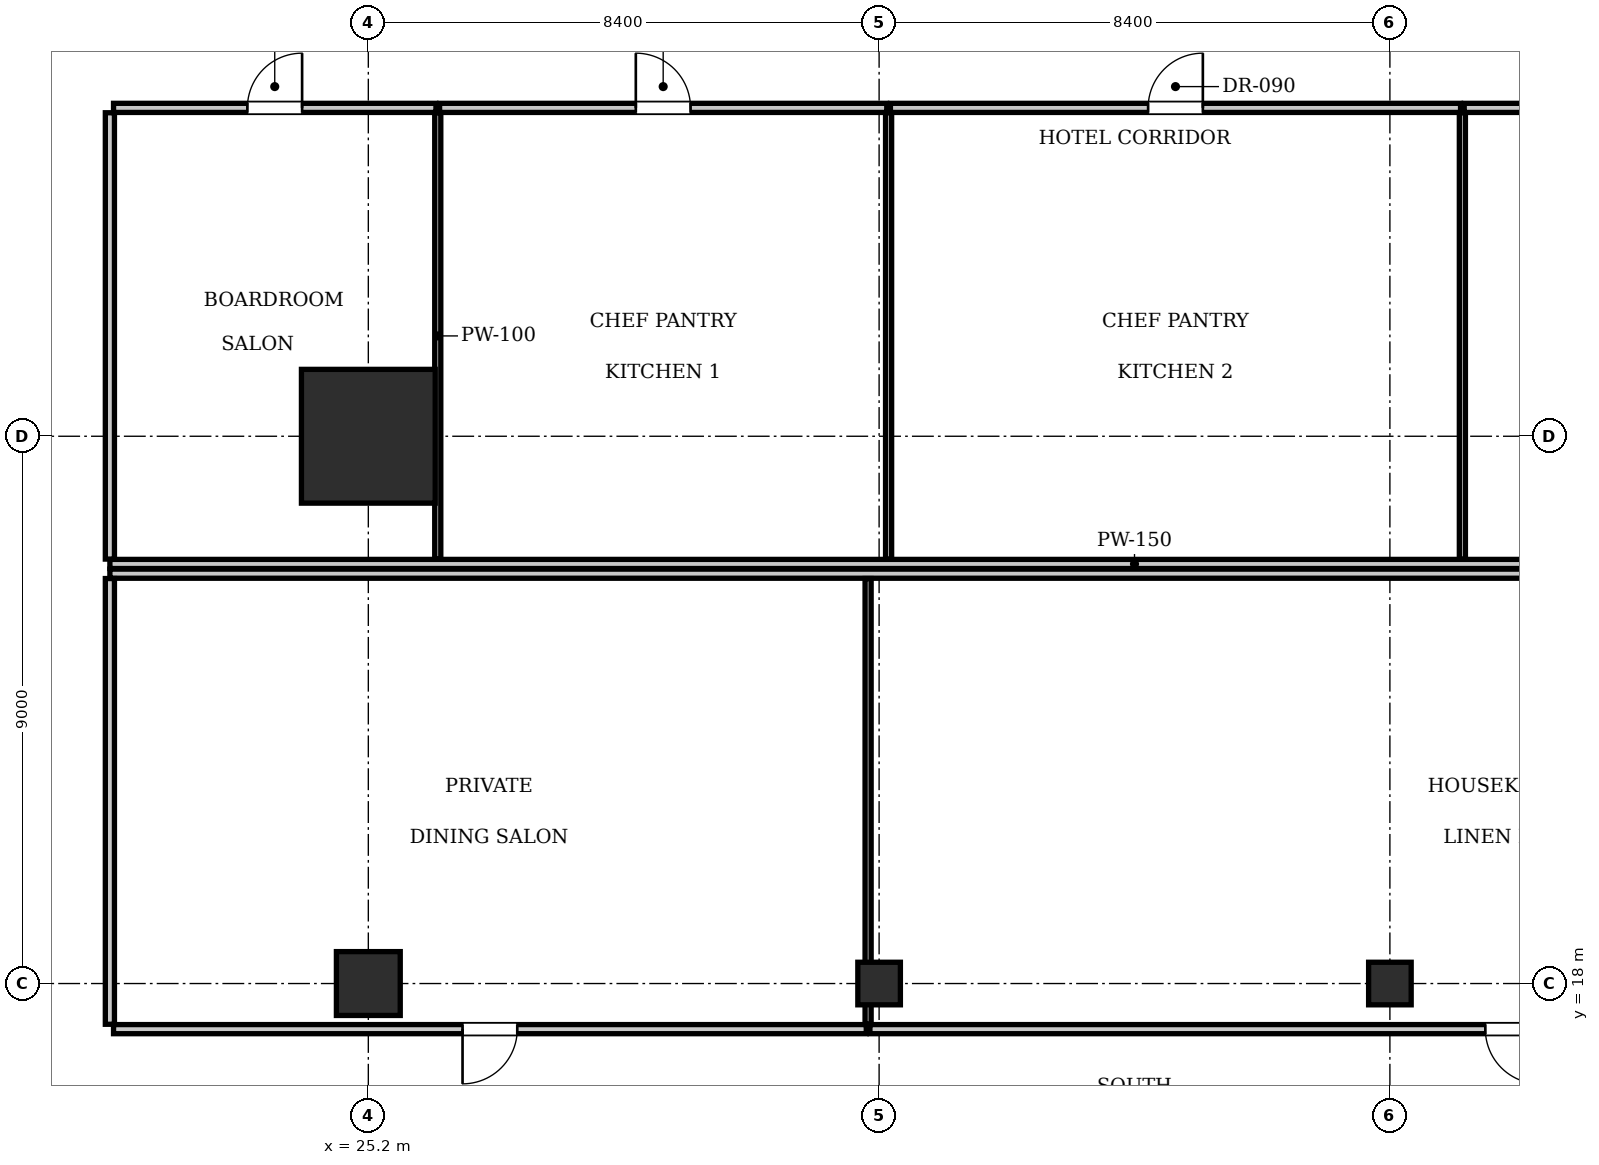
"""IFC4 building model, lengths in metres.
Left out: names, types, materials, properties, quantities, classifications, styles, units other than length and angle.
Written with IfcOpenShell. Run it as: python <this file> out.ifc"""

import sys

from ifc_helpers import new_model, si_unit, direction, frame, frame_2d, origin, origin_2d, place, context, subcontext, project, spatial, rectangle, i_section, extrude, element, fill, save


model = new_model("IFC4")
c1 = context("Model", 3, precision=1e-05, world=origin(), true_north=direction((0.0, 1.0)))
c2 = subcontext(c1, "Body", "Model", "MODEL_VIEW")
j1 = project(units=[si_unit("LENGTHUNIT", "METRE"), si_unit("PLANEANGLEUNIT", "RADIAN")], contexts=[c1])
p1 = place(None, origin())
s1 = spatial("IfcSite", under=j1, at=p1, CompositionType="ELEMENT")
p2 = place(p1, origin())
s2 = spatial("IfcBuilding", under=s1, at=p2, CompositionType="ELEMENT")
p3 = place(p2, frame((0.0, 0.0, 103.95)))
s3 = spatial("IfcBuildingStorey", under=s2, at=p3, CompositionType="ELEMENT", Elevation=103.95)
p4 = place(p3, frame((25.2, 27.0, 0.0), z_axis=(0.0, 0.0, 1.0), x_axis=(1.0, 0.0, 0.0)))
e1 = element("IfcColumn", 1, at=p4, inside=s3, PredefinedType="COLUMN", context=c2, shape_type="SweptSolid", body=[
    extrude(rectangle(XDim=2.2, YDim=2.2, at=origin_2d()), origin(), (0.0, 0.0, 1.0), 3.85),
])
p5 = place(p3, frame((25.2, 18.0, 0.0), z_axis=(0.0, 0.0, 1.0), x_axis=(1.0, 0.0, 0.0)))
e2 = element("IfcColumn", 2, at=p5, inside=s3, PredefinedType="COLUMN", context=c2, shape_type="SweptSolid", body=[
    extrude(rectangle(XDim=1.05, YDim=1.05, at=origin_2d()), origin(), (0.0, 0.0, 1.0), 3.85),
])
for number, where, z_axis, x_axis in (
    (3, (33.6, 18.0, 0.0), (0.0, 0.0, 1.0), (1.0, 0.0, 0.0)),
    (4, (42.0, 18.0, 0.0), (0.0, 0.0, 1.0), (1.0, 0.0, 0.0)),
):
    element("IfcColumn", number, at=place(p3, frame(where, z_axis=z_axis, x_axis=x_axis)), inside=s3, PredefinedType="COLUMN", context=c2, shape_type="SweptSolid", body=[
        extrude(i_section(OverallWidth=0.7, OverallDepth=0.7, WebThickness=0.028, FlangeThickness=0.044, at=origin_2d()), origin(), (0.0, 0.0, 1.0), 3.85),
    ])
p6 = place(p3, frame((20.95, 24.9, 0.0), z_axis=(0.0, 0.0, 1.0), x_axis=(1.0, 0.0, 0.0)))
e5 = element("IfcWall", 5, at=p6, inside=s3, PredefinedType="PARTITIONING", context=c2, shape_type="SweptSolid", body=[
    extrude(rectangle(XDim=33.7, YDim=0.15, at=frame_2d((16.85, 0.0))), origin(), (0.0, 0.0, 1.0), 3.61),
])
p7 = place(p3, frame((20.95, 24.98, 0.0), z_axis=(0.0, 0.0, 1.0), x_axis=(0.0, 1.0, 0.0)))
e6 = element("IfcWall", 6, at=p7, inside=s3, PredefinedType="PARTITIONING", context=c2, shape_type="SweptSolid", body=[
    extrude(rectangle(XDim=7.34, YDim=0.15, at=frame_2d((3.67, 0.0))), origin(), (0.0, 0.0, 1.0), 3.293),
])
p8 = place(p3, frame((21.01, 32.4, 0.0), z_axis=(0.0, 0.0, 1.0), x_axis=(1.0, 0.0, 0.0)))
e7 = element("IfcWall", 7, at=p8, inside=s3, PredefinedType="PARTITIONING", context=c2, shape_type="SweptSolid", body=[
    extrude(rectangle(XDim=5.302, YDim=0.15, at=frame_2d((2.651, 0.0))), origin(), (0.0, 0.0, 1.0), 3.61),
])
p9 = place(p8, frame((2.201, 0.0, 0.0)))
e8 = element("IfcOpeningElement", 8, at=p9, cuts=e7, PredefinedType="OPENING", context=c2, shape_type="SweptSolid", body=[
    extrude(rectangle(XDim=0.9, YDim=2.1, at=frame_2d((0.45, 1.05))), frame((0.0, 0.085, 0.0), z_axis=(0.0, -1.0, 0.0), x_axis=(1.0, 0.0, 0.0)), (0.0, 0.0, 1.0), 0.17),
])
p10 = place(p3, frame((26.342, 24.98, 0.0), z_axis=(0.0, 0.0, 1.0), x_axis=(0.0, 1.0, 0.0)))
e9 = element("IfcWall", 9, at=p10, inside=s3, PredefinedType="PARTITIONING", context=c2, shape_type="SweptSolid", body=[
    extrude(rectangle(XDim=7.34, YDim=0.1, at=frame_2d((3.67, 0.0))), origin(), (0.0, 0.0, 1.0), 3.61),
])
p11 = place(p3, frame((26.372, 32.4, 0.0), z_axis=(0.0, 0.0, 1.0), x_axis=(1.0, 0.0, 0.0)))
e10 = element("IfcWall", 10, at=p11, inside=s3, PredefinedType="PARTITIONING", context=c2, shape_type="SweptSolid", body=[
    extrude(rectangle(XDim=7.354, YDim=0.15, at=frame_2d((3.677, 0.0))), origin(), (0.0, 0.0, 1.0), 3.61),
])
p12 = place(p11, frame((3.227, 0.0, 0.0)))
e11 = element("IfcOpeningElement", 11, at=p12, cuts=e10, PredefinedType="OPENING", context=c2, shape_type="SweptSolid", body=[
    extrude(rectangle(XDim=0.9, YDim=2.1, at=frame_2d((0.45, 1.05))), frame((0.0, 0.085, 0.0), z_axis=(0.0, -1.0, 0.0), x_axis=(1.0, 0.0, 0.0)), (0.0, 0.0, 1.0), 0.17),
])
p13 = place(p3, frame((33.756, 24.98, 0.0), z_axis=(0.0, 0.0, 1.0), x_axis=(0.0, 1.0, 0.0)))
e12 = element("IfcWall", 12, at=p13, inside=s3, PredefinedType="PARTITIONING", context=c2, shape_type="SweptSolid", body=[
    extrude(rectangle(XDim=7.34, YDim=0.1, at=frame_2d((3.67, 0.0))), origin(), (0.0, 0.0, 1.0), 2.999),
])
p14 = place(p3, frame((33.786, 32.4, 0.0), z_axis=(0.0, 0.0, 1.0), x_axis=(1.0, 0.0, 0.0)))
e13 = element("IfcWall", 13, at=p14, inside=s3, PredefinedType="PARTITIONING", context=c2, shape_type="SweptSolid", body=[
    extrude(rectangle(XDim=9.376, YDim=0.15, at=frame_2d((4.688, 0.0))), origin(), (0.0, 0.0, 1.0), 3.61),
])
p15 = place(p14, frame((4.238, 0.0, 0.0)))
e14 = element("IfcOpeningElement", 14, at=p15, cuts=e13, PredefinedType="OPENING", context=c2, shape_type="SweptSolid", body=[
    extrude(rectangle(XDim=0.9, YDim=2.1, at=frame_2d((0.45, 1.05))), frame((0.0, 0.085, 0.0), z_axis=(0.0, -1.0, 0.0), x_axis=(1.0, 0.0, 0.0)), (0.0, 0.0, 1.0), 0.17),
])
p16 = place(p3, frame((43.192, 24.98, 0.0), z_axis=(0.0, 0.0, 1.0), x_axis=(0.0, 1.0, 0.0)))
e15 = element("IfcWall", 15, at=p16, inside=s3, PredefinedType="PARTITIONING", context=c2, shape_type="SweptSolid", body=[
    extrude(rectangle(XDim=7.34, YDim=0.1, at=frame_2d((3.67, 0.0))), origin(), (0.0, 0.0, 1.0), 3.61),
])
p17 = place(p3, frame((43.222, 32.4, 0.0), z_axis=(0.0, 0.0, 1.0), x_axis=(1.0, 0.0, 0.0)))
e16 = element("IfcWall", 16, at=p17, inside=s3, PredefinedType="PARTITIONING", context=c2, shape_type="SweptSolid", body=[
    extrude(rectangle(XDim=11.368, YDim=0.15, at=frame_2d((5.684, 0.0))), origin(), (0.0, 0.0, 1.0), 3.61),
])
p18 = place(p17, frame((5.234, 0.0, 0.0)))
e17 = element("IfcOpeningElement", 17, at=p18, cuts=e16, PredefinedType="OPENING", context=c2, shape_type="SweptSolid", body=[
    extrude(rectangle(XDim=0.9, YDim=2.1, at=frame_2d((0.45, 1.05))), frame((0.0, 0.085, 0.0), z_axis=(0.0, -1.0, 0.0), x_axis=(1.0, 0.0, 0.0)), (0.0, 0.0, 1.0), 0.17),
])
p19 = place(p3, frame((20.95, 24.74, 0.0), z_axis=(0.0, 0.0, 1.0), x_axis=(1.0, 0.0, 0.0)))
e18 = element("IfcWall", 18, at=p19, inside=s3, PredefinedType="PARTITIONING", context=c2, shape_type="SweptSolid", body=[
    extrude(rectangle(XDim=33.7, YDim=0.15, at=frame_2d((16.85, 0.0))), origin(), (0.0, 0.0, 1.0), 3.61),
])
p20 = place(p3, frame((20.95, 17.33, 0.0), z_axis=(0.0, 0.0, 1.0), x_axis=(0.0, 1.0, 0.0)))
e19 = element("IfcWall", 19, at=p20, inside=s3, PredefinedType="PARTITIONING", context=c2, shape_type="SweptSolid", body=[
    extrude(rectangle(XDim=7.33, YDim=0.15, at=frame_2d((3.665, 0.0))), origin(), (0.0, 0.0, 1.0), 3.255),
])
p21 = place(p3, frame((21.01, 17.25, 0.0), z_axis=(0.0, 0.0, 1.0), x_axis=(1.0, 0.0, 0.0)))
e20 = element("IfcWall", 20, at=p21, inside=s3, PredefinedType="PARTITIONING", context=c2, shape_type="SweptSolid", body=[
    extrude(rectangle(XDim=12.379, YDim=0.15, at=frame_2d((6.189, 0.0))), origin(), (0.0, 0.0, 1.0), 3.61),
])
p22 = place(p21, frame((5.74, 0.0, 0.0)))
e21 = element("IfcOpeningElement", 21, at=p22, cuts=e20, PredefinedType="OPENING", context=c2, shape_type="SweptSolid", body=[
    extrude(rectangle(XDim=0.9, YDim=2.1, at=frame_2d((0.45, 1.05))), frame((0.0, 0.085, 0.0), z_axis=(0.0, -1.0, 0.0), x_axis=(1.0, 0.0, 0.0)), (0.0, 0.0, 1.0), 0.17),
])
p23 = place(p3, frame((33.419, 17.33, 0.0), z_axis=(0.0, 0.0, 1.0), x_axis=(0.0, 1.0, 0.0)))
e22 = element("IfcWall", 22, at=p23, inside=s3, PredefinedType="PARTITIONING", context=c2, shape_type="SweptSolid", body=[
    extrude(rectangle(XDim=7.33, YDim=0.1, at=frame_2d((3.665, 0.0))), origin(), (0.0, 0.0, 1.0), 2.999),
])
p24 = place(p3, frame((33.449, 17.25, 0.0), z_axis=(0.0, 0.0, 1.0), x_axis=(1.0, 0.0, 0.0)))
e23 = element("IfcWall", 23, at=p24, inside=s3, PredefinedType="PARTITIONING", context=c2, shape_type="SweptSolid", body=[
    extrude(rectangle(XDim=21.141, YDim=0.15, at=frame_2d((10.571, 0.0))), origin(), (0.0, 0.0, 1.0), 3.61),
])
p25 = place(p24, frame((10.121, 0.0, 0.0)))
e24 = element("IfcOpeningElement", 24, at=p25, cuts=e23, PredefinedType="OPENING", context=c2, shape_type="SweptSolid", body=[
    extrude(rectangle(XDim=0.9, YDim=2.1, at=frame_2d((0.45, 1.05))), frame((0.0, 0.085, 0.0), z_axis=(0.0, -1.0, 0.0), x_axis=(1.0, 0.0, 0.0)), (0.0, 0.0, 1.0), 0.17),
])
p26 = place(p9, origin())
e25 = element("IfcDoor", 25, at=p26, inside=s3, OperationType="SINGLE_SWING_RIGHT", PredefinedType="DOOR", context=c2, shape_type="SweptSolid", body=[
    extrude(rectangle(XDim=0.9, YDim=2.1, at=frame_2d((0.45, 1.05))), frame((0.0, 0.025, 0.0), z_axis=(0.0, -1.0, 0.0), x_axis=(1.0, 0.0, 0.0)), (0.0, 0.0, 1.0), 0.05),
])
fill(e8, e25)
p27 = place(p12, origin())
e26 = element("IfcDoor", 26, at=p27, inside=s3, OperationType="SINGLE_SWING_LEFT", PredefinedType="DOOR", context=c2, shape_type="SweptSolid", body=[
    extrude(rectangle(XDim=0.9, YDim=2.1, at=frame_2d((0.45, 1.05))), frame((0.0, 0.025, 0.0), z_axis=(0.0, -1.0, 0.0), x_axis=(1.0, 0.0, 0.0)), (0.0, 0.0, 1.0), 0.05),
])
fill(e11, e26)
p28 = place(p15, origin())
e27 = element("IfcDoor", 27, at=p28, inside=s3, OperationType="SINGLE_SWING_RIGHT", PredefinedType="DOOR", context=c2, shape_type="SweptSolid", body=[
    extrude(rectangle(XDim=0.9, YDim=2.1, at=frame_2d((0.45, 1.05))), frame((0.0, 0.025, 0.0), z_axis=(0.0, -1.0, 0.0), x_axis=(1.0, 0.0, 0.0)), (0.0, 0.0, 1.0), 0.05),
])
fill(e14, e27)
p29 = place(p22, frame((0.9, 0.0, 0.0), z_axis=(0.0, 0.0, 1.0), x_axis=(-1.0, 0.0, 0.0)))
e28 = element("IfcDoor", 28, at=p29, inside=s3, OperationType="SINGLE_SWING_RIGHT", PredefinedType="DOOR", context=c2, shape_type="SweptSolid", body=[
    extrude(rectangle(XDim=0.9, YDim=2.1, at=frame_2d((0.45, 1.05))), frame((0.0, 0.025, 0.0), z_axis=(0.0, -1.0, 0.0), x_axis=(1.0, 0.0, 0.0)), (0.0, 0.0, 1.0), 0.05),
])
fill(e21, e28)
p30 = place(p25, frame((0.9, 0.0, 0.0), z_axis=(0.0, 0.0, 1.0), x_axis=(-1.0, 0.0, 0.0)))
e29 = element("IfcDoor", 29, at=p30, inside=s3, OperationType="SINGLE_SWING_LEFT", PredefinedType="DOOR", context=c2, shape_type="SweptSolid", body=[
    extrude(rectangle(XDim=0.9, YDim=2.1, at=frame_2d((0.45, 1.05))), frame((0.0, 0.025, 0.0), z_axis=(0.0, -1.0, 0.0), x_axis=(1.0, 0.0, 0.0)), (0.0, 0.0, 1.0), 0.05),
])
fill(e24, e29)
save(model, sys.argv[1])
